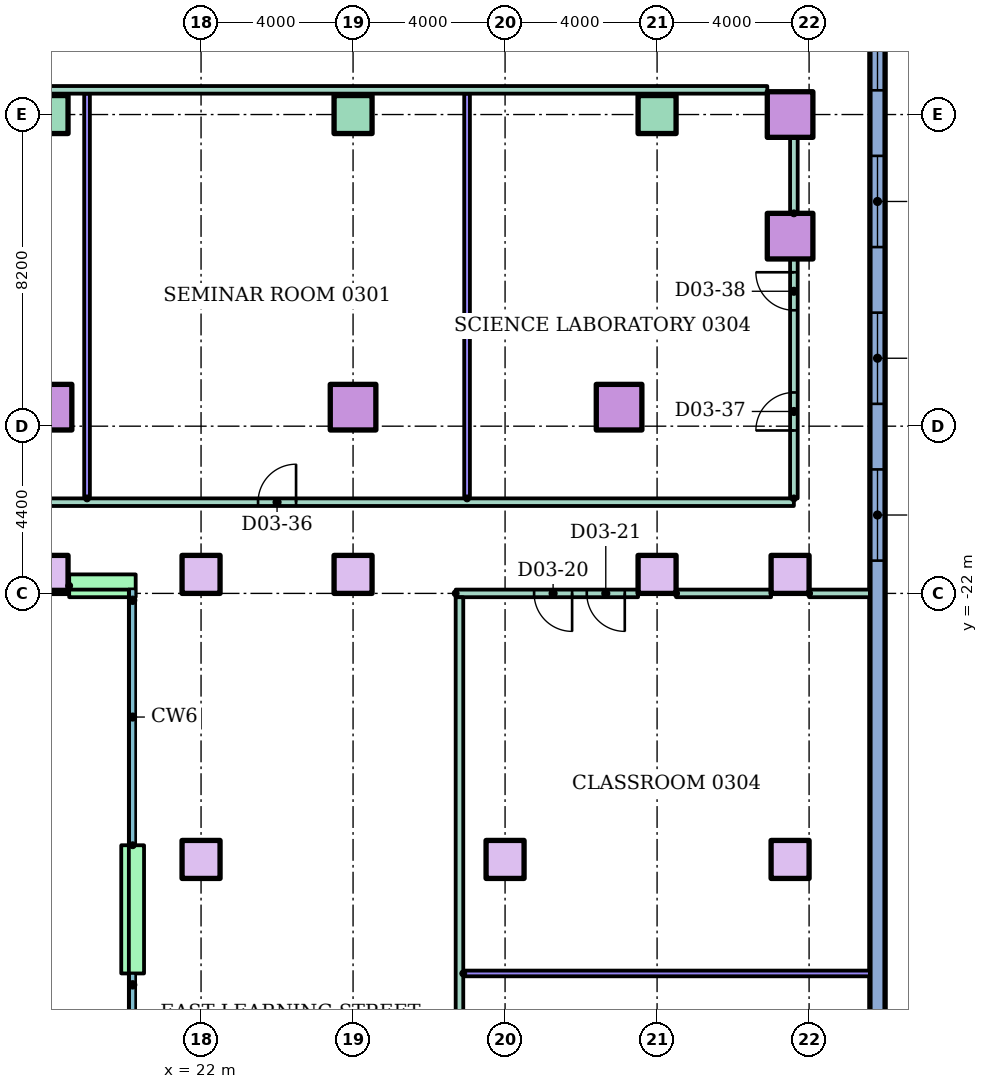
"""IFC4 building model, lengths in metres.
Left out: names, types, materials, properties, quantities, classifications, styles, units other than length and angle.
Written with IfcOpenShell. Run it as: python <this file> out.ifc"""

import sys

from ifc_helpers import new_model, si_unit, direction, frame, frame_2d, origin, origin_2d, place, context, subcontext, project, spatial, rectangle, hollow_rectangle, extrude, element, fill, save


model = new_model("IFC4")
c1 = context("Model", 3, precision=1e-05, world=origin(), true_north=direction((0.0, 1.0)))
c2 = subcontext(c1, "Body", "Model", "MODEL_VIEW")
j1 = project(units=[si_unit("LENGTHUNIT", "METRE"), si_unit("PLANEANGLEUNIT", "RADIAN")], contexts=[c1])
p1 = place(None, origin())
s1 = spatial("IfcSite", under=j1, at=p1, CompositionType="ELEMENT")
p2 = place(p1, origin())
s2 = spatial("IfcBuilding", under=s1, at=p2, CompositionType="ELEMENT")
p3 = place(p2, frame((0.0, 0.0, 14.0)))
s3 = spatial("IfcBuildingStorey", under=s2, at=p3, CompositionType="ELEMENT", Elevation=14.0)
for number, where in (
    (1, (18.0, -17.1, 0.0)),
    (2, (26.0, -17.1, 0.0)),
    (3, (33.0, -17.1, 0.0)),
    (4, (37.5, -12.6, 0.0)),
):
    element("IfcColumn", number, at=place(p3, frame(where)), inside=s3, PredefinedType="COLUMN", context=c2, shape_type="SweptSolid", body=[
        extrude(hollow_rectangle(XDim=1.2, YDim=1.2, WallThickness=0.06, at=origin_2d()), origin(), (0.0, 0.0, 1.0), 4.0),
    ])
for number, where in (
    (5, (18.0, -9.4, 0.0)),
    (6, (26.0, -9.4, 0.0)),
    (7, (34.0, -9.4, 0.0)),
):
    element("IfcColumn", number, at=place(p3, frame(where)), inside=s3, PredefinedType="COLUMN", context=c2, shape_type="SweptSolid", body=[
        extrude(rectangle(XDim=1.0, YDim=1.0, at=origin_2d()), origin(), (0.0, 0.0, 1.0), 4.0),
    ])
p4 = place(p3, frame((37.5, -9.4, 0.0)))
e8 = element("IfcColumn", 8, at=p4, inside=s3, PredefinedType="COLUMN", context=c2, shape_type="SweptSolid", body=[
    extrude(hollow_rectangle(XDim=1.2, YDim=1.2, WallThickness=0.06, at=origin_2d()), origin(), (0.0, 0.0, 1.0), 4.0),
])
for number, where in (
    (9, (22.0, -29.0, 0.0)),
    (10, (30.0, -29.0, 0.0)),
    (11, (37.5, -29.0, 0.0)),
    (12, (18.0, -21.5, 0.0)),
    (13, (22.0, -21.5, 0.0)),
    (14, (26.0, -21.5, 0.0)),
    (15, (34.0, -21.5, 0.0)),
    (16, (37.5, -21.5, 0.0)),
):
    element("IfcColumn", number, at=place(p3, frame(where)), inside=s3, PredefinedType="COLUMN", context=c2, shape_type="SweptSolid", body=[
        extrude(rectangle(XDim=1.0, YDim=1.0, at=origin_2d()), origin(), (0.0, 0.0, 1.0), 4.0),
    ])
p5 = place(p3, frame((39.8, -50.0, 0.0), z_axis=(0.0, 0.0, 1.0), x_axis=(0.0, 1.0, 0.0)))
e17 = element("IfcWall", 17, at=p5, inside=s3, PredefinedType="STANDARD", context=c2, shape_type="SweptSolid", body=[
    extrude(rectangle(XDim=70.0, YDim=0.4, at=frame_2d((35.0, 0.0))), origin(), (0.0, 0.0, 1.0), 3.7),
])
p6 = place(p5, frame((0.75, 0.0, 0.9)))
e18 = element("IfcOpeningElement", 18, at=p6, cuts=e17, PredefinedType="OPENING", context=c2, shape_type="SweptSolid", body=[
    extrude(rectangle(XDim=2.4, YDim=2.1, at=frame_2d((1.2, 1.05))), frame((0.0, 0.21, 0.0), z_axis=(0.0, -1.0, 0.0), x_axis=(1.0, 0.0, 0.0)), (0.0, 0.0, 1.0), 0.42),
])
p7 = place(p5, frame((28.863, 0.0, 0.9)))
e19 = element("IfcOpeningElement", 19, at=p7, cuts=e17, PredefinedType="OPENING", context=c2, shape_type="SweptSolid", body=[
    extrude(rectangle(XDim=2.4, YDim=2.1, at=frame_2d((1.2, 1.05))), frame((0.0, 0.21, 0.0), z_axis=(0.0, -1.0, 0.0), x_axis=(1.0, 0.0, 0.0)), (0.0, 0.0, 1.0), 0.42),
])
p8 = place(p5, frame((32.988, 0.0, 0.9)))
e20 = element("IfcOpeningElement", 20, at=p8, cuts=e17, PredefinedType="OPENING", context=c2, shape_type="SweptSolid", body=[
    extrude(rectangle(XDim=2.4, YDim=2.1, at=frame_2d((1.2, 1.05))), frame((0.0, 0.21, 0.0), z_axis=(0.0, -1.0, 0.0), x_axis=(1.0, 0.0, 0.0)), (0.0, 0.0, 1.0), 0.42),
])
p9 = place(p5, frame((37.113, 0.0, 0.9)))
e21 = element("IfcOpeningElement", 21, at=p9, cuts=e17, PredefinedType="OPENING", context=c2, shape_type="SweptSolid", body=[
    extrude(rectangle(XDim=2.4, YDim=2.1, at=frame_2d((1.2, 1.05))), frame((0.0, 0.21, 0.0), z_axis=(0.0, -1.0, 0.0), x_axis=(1.0, 0.0, 0.0)), (0.0, 0.0, 1.0), 0.42),
])
p10 = place(p5, frame((41.238, 0.0, 0.9)))
e22 = element("IfcOpeningElement", 22, at=p10, cuts=e17, PredefinedType="OPENING", context=c2, shape_type="SweptSolid", body=[
    extrude(rectangle(XDim=2.4, YDim=2.1, at=frame_2d((1.2, 1.05))), frame((0.0, 0.21, 0.0), z_axis=(0.0, -1.0, 0.0), x_axis=(1.0, 0.0, 0.0)), (0.0, 0.0, 1.0), 0.42),
])
p11 = place(p5, frame((45.363, 0.0, 0.9)))
e23 = element("IfcOpeningElement", 23, at=p11, cuts=e17, PredefinedType="OPENING", context=c2, shape_type="SweptSolid", body=[
    extrude(rectangle(XDim=2.4, YDim=2.1, at=frame_2d((1.2, 1.05))), frame((0.0, 0.21, 0.0), z_axis=(0.0, -1.0, 0.0), x_axis=(1.0, 0.0, 0.0)), (0.0, 0.0, 1.0), 0.42),
])
p12 = place(p5, frame((49.488, 0.0, 0.9)))
e24 = element("IfcOpeningElement", 24, at=p12, cuts=e17, PredefinedType="OPENING", context=c2, shape_type="SweptSolid", body=[
    extrude(rectangle(XDim=2.4, YDim=2.1, at=frame_2d((1.2, 1.05))), frame((0.0, 0.21, 0.0), z_axis=(0.0, -1.0, 0.0), x_axis=(1.0, 0.0, 0.0)), (0.0, 0.0, 1.0), 0.42),
])
p13 = place(p5, frame((53.613, 0.0, 0.9)))
e25 = element("IfcOpeningElement", 25, at=p13, cuts=e17, PredefinedType="OPENING", context=c2, shape_type="SweptSolid", body=[
    extrude(rectangle(XDim=2.4, YDim=2.1, at=frame_2d((1.2, 1.05))), frame((0.0, 0.21, 0.0), z_axis=(0.0, -1.0, 0.0), x_axis=(1.0, 0.0, 0.0)), (0.0, 0.0, 1.0), 0.42),
])
p14 = place(p5, frame((57.738, 0.0, 0.9)))
e26 = element("IfcOpeningElement", 26, at=p14, cuts=e17, PredefinedType="OPENING", context=c2, shape_type="SweptSolid", body=[
    extrude(rectangle(XDim=2.4, YDim=2.1, at=frame_2d((1.2, 1.05))), frame((0.0, 0.21, 0.0), z_axis=(0.0, -1.0, 0.0), x_axis=(1.0, 0.0, 0.0)), (0.0, 0.0, 1.0), 0.42),
])
p15 = place(p5, frame((62.05, 0.0, 0.9)))
e27 = element("IfcOpeningElement", 27, at=p15, cuts=e17, PredefinedType="OPENING", context=c2, shape_type="SweptSolid", body=[
    extrude(rectangle(XDim=2.4, YDim=2.1, at=frame_2d((1.2, 1.05))), frame((0.0, 0.21, 0.0), z_axis=(0.0, -1.0, 0.0), x_axis=(1.0, 0.0, 0.0)), (0.0, 0.0, 1.0), 0.42),
])
p16 = place(p5, frame((66.55, 0.0, 0.9)))
e28 = element("IfcOpeningElement", 28, at=p16, cuts=e17, PredefinedType="OPENING", context=c2, shape_type="SweptSolid", body=[
    extrude(rectangle(XDim=2.4, YDim=2.1, at=frame_2d((1.2, 1.05))), frame((0.0, 0.21, 0.0), z_axis=(0.0, -1.0, 0.0), x_axis=(1.0, 0.0, 0.0)), (0.0, 0.0, 1.0), 0.42),
])
p17 = place(p3, frame((18.53, -21.8, 0.0)))
e29 = element("IfcWall", 29, at=p17, inside=s3, PredefinedType="STANDARD", context=c2, shape_type="SweptSolid", body=[
    extrude(rectangle(XDim=1.75, YDim=0.6, at=frame_2d((0.875, 0.0))), origin(), (0.0, 0.0, 1.0), 3.7),
])
p18 = place(p3, frame((20.2, -28.627, 0.0), z_axis=(0.0, 0.0, 1.0), x_axis=(0.0, -1.0, 0.0)))
e30 = element("IfcWall", 30, at=p18, inside=s3, PredefinedType="STANDARD", context=c2, shape_type="SweptSolid", body=[
    extrude(rectangle(XDim=3.373, YDim=0.6, at=frame_2d((1.687, 0.0))), origin(), (0.0, 0.0, 1.0), 3.7),
])
p19 = place(p3, frame((28.9, -32.0, 0.0)))
e31 = element("IfcWall", 31, at=p19, inside=s3, PredefinedType="PARTITIONING", context=c2, shape_type="SweptSolid", body=[
    extrude(rectangle(XDim=10.7, YDim=0.15, at=frame_2d((5.35, 0.0))), origin(), (0.0, 0.0, 1.0), 3.7),
])
p20 = place(p3, frame((28.7, -22.0, 0.0)))
e32 = element("IfcWall", 32, at=p20, inside=s3, PredefinedType="PARTITIONING", context=c2, shape_type="SweptSolid", body=[
    extrude(rectangle(XDim=4.8, YDim=0.2, at=frame_2d((2.4, 0.0))), origin(), (0.0, 0.0, 1.0), 3.7),
])
p21 = place(p20, frame((2.064, 0.0, 0.0)))
e33 = element("IfcOpeningElement", 33, at=p21, cuts=e32, PredefinedType="OPENING", context=c2, shape_type="SweptSolid", body=[
    extrude(rectangle(XDim=1.0, YDim=2.1, at=frame_2d((0.5, 1.05))), frame((0.0, 0.11, 0.0), z_axis=(0.0, -1.0, 0.0), x_axis=(1.0, 0.0, 0.0)), (0.0, 0.0, 1.0), 0.22),
])
p22 = place(p20, frame((3.45, 0.0, 0.0)))
e34 = element("IfcOpeningElement", 34, at=p22, cuts=e32, PredefinedType="OPENING", context=c2, shape_type="SweptSolid", body=[
    extrude(rectangle(XDim=1.0, YDim=2.1, at=frame_2d((0.5, 1.05))), frame((0.0, 0.11, 0.0), z_axis=(0.0, -1.0, 0.0), x_axis=(1.0, 0.0, 0.0)), (0.0, 0.0, 1.0), 0.22),
])
p23 = place(p3, frame((34.5, -22.0, 0.0)))
e35 = element("IfcWall", 35, at=p23, inside=s3, PredefinedType="PARTITIONING", context=c2, shape_type="SweptSolid", body=[
    extrude(rectangle(XDim=2.5, YDim=0.2, at=frame_2d((1.25, 0.0))), origin(), (0.0, 0.0, 1.0), 3.7),
])
p24 = place(p3, frame((38.0, -22.0, 0.0)))
e36 = element("IfcWall", 36, at=p24, inside=s3, PredefinedType="PARTITIONING", context=c2, shape_type="SweptSolid", body=[
    extrude(rectangle(XDim=1.6, YDim=0.2, at=frame_2d((0.8, 0.0))), origin(), (0.0, 0.0, 1.0), 3.7),
])
p25 = place(p3, frame((-37.6, -19.6, 0.0)))
e37 = element("IfcWall", 37, at=p25, inside=s3, PredefinedType="PARTITIONING", context=c2, shape_type="SweptSolid", body=[
    extrude(rectangle(XDim=75.2, YDim=0.2, at=frame_2d((37.6, 0.0))), origin(), (0.0, 0.0, 1.0), 3.7),
])
p26 = place(p25, frame((2.14, 0.0, 0.0)))
e38 = element("IfcOpeningElement", 38, at=p26, cuts=e37, PredefinedType="OPENING", context=c2, shape_type="SweptSolid", body=[
    extrude(rectangle(XDim=1.0, YDim=2.1, at=frame_2d((0.5, 1.05))), frame((0.0, 0.11, 0.0), z_axis=(0.0, -1.0, 0.0), x_axis=(1.0, 0.0, 0.0)), (0.0, 0.0, 1.0), 0.22),
])
p27 = place(p25, frame((8.86, 0.0, 0.0)))
e39 = element("IfcOpeningElement", 39, at=p27, cuts=e37, PredefinedType="OPENING", context=c2, shape_type="SweptSolid", body=[
    extrude(rectangle(XDim=1.0, YDim=2.1, at=frame_2d((0.5, 1.05))), frame((0.0, 0.11, 0.0), z_axis=(0.0, -1.0, 0.0), x_axis=(1.0, 0.0, 0.0)), (0.0, 0.0, 1.0), 0.22),
])
p28 = place(p25, frame((14.14, 0.0, 0.0)))
e40 = element("IfcOpeningElement", 40, at=p28, cuts=e37, PredefinedType="OPENING", context=c2, shape_type="SweptSolid", body=[
    extrude(rectangle(XDim=1.0, YDim=2.1, at=frame_2d((0.5, 1.05))), frame((0.0, 0.11, 0.0), z_axis=(0.0, -1.0, 0.0), x_axis=(1.0, 0.0, 0.0)), (0.0, 0.0, 1.0), 0.22),
])
p29 = place(p25, frame((20.86, 0.0, 0.0)))
e41 = element("IfcOpeningElement", 41, at=p29, cuts=e37, PredefinedType="OPENING", context=c2, shape_type="SweptSolid", body=[
    extrude(rectangle(XDim=1.0, YDim=2.1, at=frame_2d((0.5, 1.05))), frame((0.0, 0.11, 0.0), z_axis=(0.0, -1.0, 0.0), x_axis=(1.0, 0.0, 0.0)), (0.0, 0.0, 1.0), 0.22),
])
p30 = place(p25, frame((26.14, 0.0, 0.0)))
e42 = element("IfcOpeningElement", 42, at=p30, cuts=e37, PredefinedType="OPENING", context=c2, shape_type="SweptSolid", body=[
    extrude(rectangle(XDim=1.0, YDim=2.1, at=frame_2d((0.5, 1.05))), frame((0.0, 0.11, 0.0), z_axis=(0.0, -1.0, 0.0), x_axis=(1.0, 0.0, 0.0)), (0.0, 0.0, 1.0), 0.22),
])
p31 = place(p25, frame((32.86, 0.0, 0.0)))
e43 = element("IfcOpeningElement", 43, at=p31, cuts=e37, PredefinedType="OPENING", context=c2, shape_type="SweptSolid", body=[
    extrude(rectangle(XDim=1.0, YDim=2.1, at=frame_2d((0.5, 1.05))), frame((0.0, 0.11, 0.0), z_axis=(0.0, -1.0, 0.0), x_axis=(1.0, 0.0, 0.0)), (0.0, 0.0, 1.0), 0.22),
])
p32 = place(p25, frame((39.85, 0.0, 0.0)))
e44 = element("IfcOpeningElement", 44, at=p32, cuts=e37, PredefinedType="OPENING", context=c2, shape_type="SweptSolid", body=[
    extrude(rectangle(XDim=0.9, YDim=2.1, at=frame_2d((0.45, 1.05))), frame((0.0, 0.11, 0.0), z_axis=(0.0, -1.0, 0.0), x_axis=(1.0, 0.0, 0.0)), (0.0, 0.0, 1.0), 0.22),
])
p33 = place(p25, frame((50.1, 0.0, 0.0)))
e45 = element("IfcOpeningElement", 45, at=p33, cuts=e37, PredefinedType="OPENING", context=c2, shape_type="SweptSolid", body=[
    extrude(rectangle(XDim=1.0, YDim=2.1, at=frame_2d((0.5, 1.05))), frame((0.0, 0.11, 0.0), z_axis=(0.0, -1.0, 0.0), x_axis=(1.0, 0.0, 0.0)), (0.0, 0.0, 1.0), 0.22),
])
p34 = place(p25, frame((61.1, 0.0, 0.0)))
e46 = element("IfcOpeningElement", 46, at=p34, cuts=e37, PredefinedType="OPENING", context=c2, shape_type="SweptSolid", body=[
    extrude(rectangle(XDim=1.0, YDim=2.1, at=frame_2d((0.5, 1.05))), frame((0.0, 0.11, 0.0), z_axis=(0.0, -1.0, 0.0), x_axis=(1.0, 0.0, 0.0)), (0.0, 0.0, 1.0), 0.22),
])
p35 = place(p3, frame((-36.9, -8.75, 0.0)))
e47 = element("IfcWall", 47, at=p35, inside=s3, PredefinedType="PARTITIONING", context=c2, shape_type="SweptSolid", body=[
    extrude(rectangle(XDim=73.8, YDim=0.2, at=frame_2d((36.9, 0.0))), origin(), (0.0, 0.0, 1.0), 3.7),
])
p36 = place(p3, frame((19.0, -19.5, 0.0), z_axis=(0.0, 0.0, 1.0), x_axis=(0.0, 1.0, 0.0)))
e48 = element("IfcWall", 48, at=p36, inside=s3, PredefinedType="PARTITIONING", context=c2, shape_type="SweptSolid", body=[
    extrude(rectangle(XDim=10.65, YDim=0.15, at=frame_2d((5.325, 0.0))), origin(), (0.0, 0.0, 1.0), 3.7),
])
p37 = place(p3, frame((28.8, -44.0, 0.0), z_axis=(0.0, 0.0, 1.0), x_axis=(0.0, 1.0, 0.0)))
e49 = element("IfcWall", 49, at=p37, inside=s3, PredefinedType="PARTITIONING", context=c2, shape_type="SweptSolid", body=[
    extrude(rectangle(XDim=21.9, YDim=0.2, at=frame_2d((10.95, 0.0))), origin(), (0.0, 0.0, 1.0), 3.7),
])
p38 = place(p37, frame((2.14, 0.0, 0.0)))
e50 = element("IfcOpeningElement", 50, at=p38, cuts=e49, PredefinedType="OPENING", context=c2, shape_type="SweptSolid", body=[
    extrude(rectangle(XDim=1.0, YDim=2.1, at=frame_2d((0.5, 1.05))), frame((0.0, 0.11, 0.0), z_axis=(0.0, -1.0, 0.0), x_axis=(1.0, 0.0, 0.0)), (0.0, 0.0, 1.0), 0.22),
])
p39 = place(p37, frame((8.86, 0.0, 0.0)))
e51 = element("IfcOpeningElement", 51, at=p39, cuts=e49, PredefinedType="OPENING", context=c2, shape_type="SweptSolid", body=[
    extrude(rectangle(XDim=1.0, YDim=2.1, at=frame_2d((0.5, 1.05))), frame((0.0, 0.11, 0.0), z_axis=(0.0, -1.0, 0.0), x_axis=(1.0, 0.0, 0.0)), (0.0, 0.0, 1.0), 0.22),
])
p40 = place(p3, frame((29.0, -19.5, 0.0), z_axis=(0.0, 0.0, 1.0), x_axis=(0.0, 1.0, 0.0)))
e52 = element("IfcWall", 52, at=p40, inside=s3, PredefinedType="PARTITIONING", context=c2, shape_type="SweptSolid", body=[
    extrude(rectangle(XDim=10.65, YDim=0.15, at=frame_2d((5.325, 0.0))), origin(), (0.0, 0.0, 1.0), 3.7),
])
p41 = place(p3, frame((37.6, -19.5, 0.0), z_axis=(0.0, 0.0, 1.0), x_axis=(0.0, 1.0, 0.0)))
e53 = element("IfcWall", 53, at=p41, inside=s3, PredefinedType="PARTITIONING", context=c2, shape_type="SweptSolid", body=[
    extrude(rectangle(XDim=6.3, YDim=0.2, at=frame_2d((3.15, 0.0))), origin(), (0.0, 0.0, 1.0), 3.7),
])
p42 = place(p41, frame((1.787, 0.0, 0.0)))
e54 = element("IfcOpeningElement", 54, at=p42, cuts=e53, PredefinedType="OPENING", context=c2, shape_type="SweptSolid", body=[
    extrude(rectangle(XDim=1.0, YDim=2.1, at=frame_2d((0.5, 1.05))), frame((0.0, 0.11, 0.0), z_axis=(0.0, -1.0, 0.0), x_axis=(1.0, 0.0, 0.0)), (0.0, 0.0, 1.0), 0.22),
])
p43 = place(p41, frame((4.95, 0.0, 0.0)))
e55 = element("IfcOpeningElement", 55, at=p43, cuts=e53, PredefinedType="OPENING", context=c2, shape_type="SweptSolid", body=[
    extrude(rectangle(XDim=1.0, YDim=2.1, at=frame_2d((0.5, 1.05))), frame((0.0, 0.11, 0.0), z_axis=(0.0, -1.0, 0.0), x_axis=(1.0, 0.0, 0.0)), (0.0, 0.0, 1.0), 0.22),
])
p44 = place(p3, frame((37.6, -12.0, 0.0), z_axis=(0.0, 0.0, 1.0), x_axis=(0.0, 1.0, 0.0)))
e56 = element("IfcWall", 56, at=p44, inside=s3, PredefinedType="PARTITIONING", context=c2, shape_type="SweptSolid", body=[
    extrude(rectangle(XDim=2.0, YDim=0.2, at=frame_2d((1.0, 0.0))), origin(), (0.0, 0.0, 1.0), 3.7),
])
p45 = place(p7, origin())
e57 = element("IfcWindow", 57, at=p45, inside=s3, PartitioningType="SINGLE_PANEL", PredefinedType="WINDOW", context=c2, shape_type="SweptSolid", body=[
    extrude(rectangle(XDim=2.4, YDim=2.1, at=frame_2d((1.2, 1.05))), frame((0.0, 0.03, 0.0), z_axis=(0.0, -1.0, 0.0), x_axis=(1.0, 0.0, 0.0)), (0.0, 0.0, 1.0), 0.06),
])
fill(e19, e57)
p46 = place(p8, origin())
e58 = element("IfcWindow", 58, at=p46, inside=s3, PartitioningType="SINGLE_PANEL", PredefinedType="WINDOW", context=c2, shape_type="SweptSolid", body=[
    extrude(rectangle(XDim=2.4, YDim=2.1, at=frame_2d((1.2, 1.05))), frame((0.0, 0.03, 0.0), z_axis=(0.0, -1.0, 0.0), x_axis=(1.0, 0.0, 0.0)), (0.0, 0.0, 1.0), 0.06),
])
fill(e20, e58)
p47 = place(p9, origin())
e59 = element("IfcWindow", 59, at=p47, inside=s3, PartitioningType="SINGLE_PANEL", PredefinedType="WINDOW", context=c2, shape_type="SweptSolid", body=[
    extrude(rectangle(XDim=2.4, YDim=2.1, at=frame_2d((1.2, 1.05))), frame((0.0, 0.03, 0.0), z_axis=(0.0, -1.0, 0.0), x_axis=(1.0, 0.0, 0.0)), (0.0, 0.0, 1.0), 0.06),
])
fill(e21, e59)
p48 = place(p10, origin())
e60 = element("IfcWindow", 60, at=p48, inside=s3, PartitioningType="SINGLE_PANEL", PredefinedType="WINDOW", context=c2, shape_type="SweptSolid", body=[
    extrude(rectangle(XDim=2.4, YDim=2.1, at=frame_2d((1.2, 1.05))), frame((0.0, 0.03, 0.0), z_axis=(0.0, -1.0, 0.0), x_axis=(1.0, 0.0, 0.0)), (0.0, 0.0, 1.0), 0.06),
])
fill(e22, e60)
p49 = place(p21, frame((1.0, 0.0, 0.0), z_axis=(0.0, 0.0, 1.0), x_axis=(-1.0, 0.0, 0.0)))
e61 = element("IfcDoor", 61, at=p49, inside=s3, OperationType="SINGLE_SWING_RIGHT", PredefinedType="DOOR", context=c2, shape_type="SweptSolid", body=[
    extrude(rectangle(XDim=1.0, YDim=2.1, at=frame_2d((0.5, 1.05))), frame((0.0, 0.025, 0.0), z_axis=(0.0, -1.0, 0.0), x_axis=(1.0, 0.0, 0.0)), (0.0, 0.0, 1.0), 0.05),
])
fill(e33, e61)
p50 = place(p22, frame((1.0, 0.0, 0.0), z_axis=(0.0, 0.0, 1.0), x_axis=(-1.0, 0.0, 0.0)))
e62 = element("IfcDoor", 62, at=p50, inside=s3, OperationType="SINGLE_SWING_RIGHT", PredefinedType="DOOR", context=c2, shape_type="SweptSolid", body=[
    extrude(rectangle(XDim=1.0, YDim=2.1, at=frame_2d((0.5, 1.05))), frame((0.0, 0.025, 0.0), z_axis=(0.0, -1.0, 0.0), x_axis=(1.0, 0.0, 0.0)), (0.0, 0.0, 1.0), 0.05),
])
fill(e34, e62)
p51 = place(p34, origin())
e63 = element("IfcDoor", 63, at=p51, inside=s3, OperationType="SINGLE_SWING_RIGHT", PredefinedType="DOOR", context=c2, shape_type="SweptSolid", body=[
    extrude(rectangle(XDim=1.0, YDim=2.1, at=frame_2d((0.5, 1.05))), frame((0.0, 0.025, 0.0), z_axis=(0.0, -1.0, 0.0), x_axis=(1.0, 0.0, 0.0)), (0.0, 0.0, 1.0), 0.05),
])
fill(e46, e63)
p52 = place(p42, origin())
e64 = element("IfcDoor", 64, at=p52, inside=s3, OperationType="SINGLE_SWING_LEFT", PredefinedType="DOOR", context=c2, shape_type="SweptSolid", body=[
    extrude(rectangle(XDim=1.0, YDim=2.1, at=frame_2d((0.5, 1.05))), frame((0.0, 0.025, 0.0), z_axis=(0.0, -1.0, 0.0), x_axis=(1.0, 0.0, 0.0)), (0.0, 0.0, 1.0), 0.05),
])
fill(e54, e64)
p53 = place(p43, origin())
e65 = element("IfcDoor", 65, at=p53, inside=s3, OperationType="SINGLE_SWING_RIGHT", PredefinedType="DOOR", context=c2, shape_type="SweptSolid", body=[
    extrude(rectangle(XDim=1.0, YDim=2.1, at=frame_2d((0.5, 1.05))), frame((0.0, 0.025, 0.0), z_axis=(0.0, -1.0, 0.0), x_axis=(1.0, 0.0, 0.0)), (0.0, 0.0, 1.0), 0.05),
])
fill(e55, e65)
save(model, sys.argv[1])
